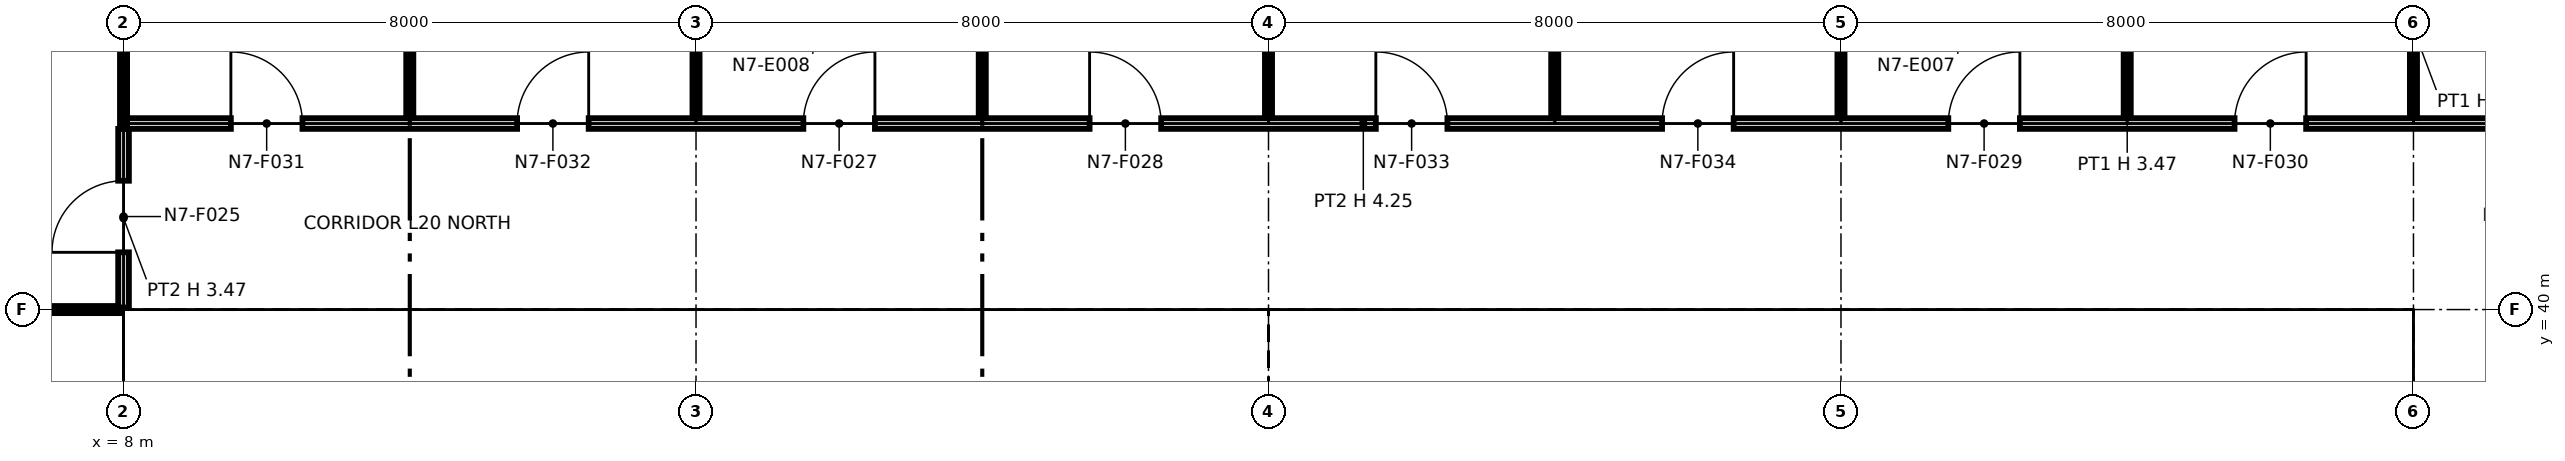
"""IFC4 building model, lengths in metres.
Left out: names, types, materials, properties, quantities, classifications, styles, units other than length and angle.
Written with IfcOpenShell. Run it as: python <this file> out.ifc"""

import sys

from ifc_helpers import new_model, si_unit, direction, frame, frame_2d, origin, origin_2d, place, context, subcontext, project, spatial, polyline, rectangle, i_section, outline, extrude, element, fill, save


model = new_model("IFC4")
c1 = context("Model", 3, precision=1e-05, world=origin(), true_north=direction((0.0, 1.0)))
c2 = subcontext(c1, "Body", "Model", "MODEL_VIEW")
j1 = project(units=[si_unit("LENGTHUNIT", "METRE"), si_unit("PLANEANGLEUNIT", "RADIAN")], contexts=[c1])
p1 = place(None, origin())
s1 = spatial("IfcSite", under=j1, at=p1, CompositionType="ELEMENT")
p2 = place(p1, origin())
s2 = spatial("IfcBuilding", under=s1, at=p2, CompositionType="ELEMENT")
p3 = place(p2, frame((0.0, 0.0, 105.2)))
s3 = spatial("IfcBuildingStorey", under=s2, at=p3, CompositionType="ELEMENT", Elevation=105.2)
for number, where, z_axis, x_axis in (
    (1, (8.0, 40.0, 0.0), (0.0, 0.0, 1.0), (1.0, 0.0, 0.0)),
    (2, (16.0, 40.0, 0.0), (0.0, 0.0, 1.0), (1.0, 0.0, 0.0)),
):
    element("IfcColumn", number, at=place(p3, frame(where, z_axis=z_axis, x_axis=x_axis)), inside=s3, PredefinedType="COLUMN", context=c2, shape_type="SweptSolid", body=[
        extrude(i_section(OverallWidth=0.373, OverallDepth=0.368, WebThickness=0.015, FlangeThickness=0.024, at=origin_2d()), origin(), (0.0, 0.0, 1.0), 4.25),
    ])
p4 = place(p3, frame((24.0, 40.0, 0.0), z_axis=(0.0, 0.0, 1.0), x_axis=(1.0, 0.0, 0.0)))
e3 = element("IfcColumn", 3, at=p4, inside=s3, PredefinedType="COLUMN", context=c2, shape_type="SweptSolid", body=[
    extrude(i_section(OverallWidth=0.394, OverallDepth=0.376, WebThickness=0.017, FlangeThickness=0.028, at=origin_2d()), origin(), (0.0, 0.0, 1.0), 4.25),
])
for number, where, z_axis, x_axis in (
    (4, (32.0, 40.0, 0.0), (0.0, 0.0, 1.0), (1.0, 0.0, 0.0)),
    (5, (40.0, 40.0, 0.0), (0.0, 0.0, 1.0), (1.0, 0.0, 0.0)),
):
    element("IfcColumn", number, at=place(p3, frame(where, z_axis=z_axis, x_axis=x_axis)), inside=s3, PredefinedType="COLUMN", context=c2, shape_type="SweptSolid", body=[
        extrude(i_section(OverallWidth=0.257, OverallDepth=0.363, WebThickness=0.013, FlangeThickness=0.022, at=origin_2d()), origin(), (0.0, 0.0, 1.0), 4.25),
    ])
p5 = place(p3, frame((8.75, 32.85, 0.0), z_axis=(0.0, 0.0, 1.0), x_axis=(0.0, 1.0, 0.0)))
e6 = element("IfcWall", 6, at=p5, inside=s3, PredefinedType="PARTITIONING", context=c2, shape_type="SweptSolid", body=[
    extrude(outline(polyline([(0.0, 0.0), (6.3, 0.0), (6.3, 4.25), (3.231, 4.25), (3.23, 3.789), (3.07, 3.789), (3.069, 4.25), (0.0, 4.25), (0.0, 0.0)])), frame((0.0, 0.1, 0.0), z_axis=(0.0, -1.0, 0.0), x_axis=(1.0, 0.0, 0.0)), (0.0, 0.0, 1.0), 0.2),
])
p6 = place(p3, frame((8.65, 39.25, 0.0), z_axis=(0.0, 0.0, 1.0), x_axis=(1.0, 0.0, 0.0)))
e7 = element("IfcWall", 7, at=p6, inside=s3, PredefinedType="PARTITIONING", context=c2, shape_type="SweptSolid", body=[
    extrude(outline(polyline([(0.0, 0.0), (14.7, 0.0), (14.7, 4.25), (7.469, 4.25), (7.469, 3.632), (7.231, 3.632), (7.23, 4.25), (0.0, 4.25), (0.0, 0.0)])), frame((0.0, 0.1, 0.0), z_axis=(0.0, -1.0, 0.0), x_axis=(1.0, 0.0, 0.0)), (0.0, 0.0, 1.0), 0.2),
])
for number, where, z_axis, x_axis in (
    (8, (11.875, 34.95, 0.0), (0.0, 0.0, 1.0), (0.0, 1.0, 0.0)),
    (9, (13.925, 34.95, 0.0), (0.0, 0.0, 1.0), (0.0, 1.0, 0.0)),
):
    element("IfcWall", number, at=place(p3, frame(where, z_axis=z_axis, x_axis=x_axis)), inside=s3, PredefinedType="PARTITIONING", context=c2, shape_type="SweptSolid", body=[
        extrude(outline(polyline([(0.0, 0.0), (4.2, 0.0), (4.2, 4.25), (1.132, 4.25), (1.131, 3.789), (0.969, 3.789), (0.969, 4.25), (0.0, 4.25), (0.0, 0.0)])), frame((0.0, 0.075, 0.0), z_axis=(0.0, -1.0, 0.0), x_axis=(1.0, 0.0, 0.0)), (0.0, 0.0, 1.0), 0.15),
    ])
p7 = place(p3, frame((16.0, 34.95, 0.0), z_axis=(0.0, 0.0, 1.0), x_axis=(0.0, 1.0, 0.0)))
e10 = element("IfcWall", 10, at=p7, inside=s3, PredefinedType="PARTITIONING", context=c2, shape_type="SweptSolid", body=[
    extrude(rectangle(XDim=4.2, YDim=0.6, at=frame_2d((2.1, 0.0))), origin(), (0.0, 0.0, 1.0), 3.632),
])
for number, where, z_axis, x_axis in (
    (11, (19.2, 32.85, 0.0), (0.0, 0.0, 1.0), (0.0, 1.0, 0.0)),
    (12, (23.25, 32.85, 0.0), (0.0, 0.0, 1.0), (0.0, 1.0, 0.0)),
):
    element("IfcWall", number, at=place(p3, frame(where, z_axis=z_axis, x_axis=x_axis)), inside=s3, PredefinedType="PARTITIONING", context=c2, shape_type="SweptSolid", body=[
        extrude(rectangle(XDim=6.3, YDim=0.2, at=frame_2d((3.15, 0.0))), origin(), (0.0, 0.0, 1.0), 4.25),
    ])
p8 = place(p3, frame((24.75, 32.85, 0.0), z_axis=(0.0, 0.0, 1.0), x_axis=(0.0, 1.0, 0.0)))
e13 = element("IfcWall", 13, at=p8, inside=s3, PredefinedType="PARTITIONING", context=c2, shape_type="SweptSolid", body=[
    extrude(outline(polyline([(0.0, 0.0), (6.3, 0.0), (6.3, 4.25), (3.231, 4.25), (3.23, 3.789), (3.07, 3.789), (3.069, 4.25), (0.0, 4.25), (0.0, 0.0)])), frame((0.0, 0.1, 0.0), z_axis=(0.0, -1.0, 0.0), x_axis=(1.0, 0.0, 0.0)), (0.0, 0.0, 1.0), 0.2),
])
p9 = place(p3, frame((24.65, 39.25, 0.0), z_axis=(0.0, 0.0, 1.0), x_axis=(1.0, 0.0, 0.0)))
e14 = element("IfcWall", 14, at=p9, inside=s3, PredefinedType="PARTITIONING", context=c2, shape_type="SweptSolid", body=[
    extrude(outline(polyline([(0.0, 0.0), (14.7, 0.0), (14.7, 4.25), (7.469, 4.25), (7.469, 3.632), (7.231, 3.632), (7.23, 4.25), (0.0, 4.25), (0.0, 0.0)])), frame((0.0, 0.1, 0.0), z_axis=(0.0, -1.0, 0.0), x_axis=(1.0, 0.0, 0.0)), (0.0, 0.0, 1.0), 0.2),
])
for number, where, z_axis, x_axis in (
    (15, (27.2, 36.6, 0.0), (0.0, 0.0, 1.0), (0.0, 1.0, 0.0)),
    (16, (29.5, 36.6, 0.0), (0.0, 0.0, 1.0), (0.0, 1.0, 0.0)),
):
    element("IfcWall", number, at=place(p3, frame(where, z_axis=z_axis, x_axis=x_axis)), inside=s3, PredefinedType="PARTITIONING", context=c2, shape_type="SweptSolid", body=[
        extrude(rectangle(XDim=2.55, YDim=0.2, at=frame_2d((1.275, 0.0))), origin(), (0.0, 0.0, 1.0), 4.25),
    ])
p10 = place(p3, frame((32.0, 36.6, 0.0), z_axis=(0.0, 0.0, 1.0), x_axis=(0.0, 1.0, 0.0)))
e17 = element("IfcWall", 17, at=p10, inside=s3, PredefinedType="PARTITIONING", context=c2, shape_type="SweptSolid", body=[
    extrude(rectangle(XDim=2.55, YDim=0.6, at=frame_2d((1.275, 0.0))), origin(), (0.0, 0.0, 1.0), 3.632),
])
for number, where, z_axis, x_axis in (
    (18, (35.6, 32.85, 0.0), (0.0, 0.0, 1.0), (0.0, 1.0, 0.0)),
    (19, (39.25, 32.85, 0.0), (0.0, 0.0, 1.0), (0.0, 1.0, 0.0)),
):
    element("IfcWall", number, at=place(p3, frame(where, z_axis=z_axis, x_axis=x_axis)), inside=s3, PredefinedType="PARTITIONING", context=c2, shape_type="SweptSolid", body=[
        extrude(rectangle(XDim=6.3, YDim=0.2, at=frame_2d((3.15, 0.0))), origin(), (0.0, 0.0, 1.0), 4.25),
    ])
p11 = place(p3, frame((2.83, 40.0, 0.0), z_axis=(0.0, 0.0, 1.0), x_axis=(1.0, 0.0, 0.0)))
e20 = element("IfcWall", 20, at=p11, inside=s3, PredefinedType="PARTITIONING", context=c2, shape_type="SweptSolid", body=[
    extrude(rectangle(XDim=5.14, YDim=0.1, at=frame_2d((2.57, 0.0))), origin(), (0.0, 0.0, 1.0), 3.47),
])
p12 = place(p3, frame((8.0, 40.03, 0.0), z_axis=(0.0, 0.0, 1.0), x_axis=(0.0, 1.0, 0.0)))
e21 = element("IfcWall", 21, at=p12, inside=s3, PredefinedType="PARTITIONING", context=c2, shape_type="SweptSolid", body=[
    extrude(rectangle(XDim=2.495, YDim=0.15, at=frame_2d((1.248, 0.0))), origin(), (0.0, 0.0, 1.0), 3.47),
])
p13 = place(p12, frame((0.77, 0.0, 0.0)))
e22 = element("IfcOpeningElement", 22, at=p13, cuts=e21, PredefinedType="OPENING", context=c2, shape_type="SweptSolid", body=[
    extrude(rectangle(XDim=1.0, YDim=2.1, at=frame_2d((0.5, 1.05))), frame((0.0, 0.085, 0.0), z_axis=(0.0, -1.0, 0.0), x_axis=(1.0, 0.0, 0.0)), (0.0, 0.0, 1.0), 0.17),
])
p14 = place(p3, frame((8.05, 42.6, 0.0), z_axis=(0.0, 0.0, 1.0), x_axis=(1.0, 0.0, 0.0)))
e23 = element("IfcWall", 23, at=p14, inside=s3, PredefinedType="PARTITIONING", context=c2, shape_type="SweptSolid", body=[
    extrude(rectangle(XDim=34.55, YDim=0.15, at=frame_2d((17.275, 0.0))), origin(), (0.0, 0.0, 1.0), 4.25),
])
p15 = place(p14, frame((9.45, 0.0, 0.0)))
e24 = element("IfcOpeningElement", 24, at=p15, cuts=e23, PredefinedType="OPENING", context=c2, shape_type="SweptSolid", body=[
    extrude(rectangle(XDim=1.0, YDim=2.1, at=frame_2d((0.5, 1.05))), frame((0.0, 0.085, 0.0), z_axis=(0.0, -1.0, 0.0), x_axis=(1.0, 0.0, 0.0)), (0.0, 0.0, 1.0), 0.17),
])
p16 = place(p14, frame((13.45, 0.0, 0.0)))
e25 = element("IfcOpeningElement", 25, at=p16, cuts=e23, PredefinedType="OPENING", context=c2, shape_type="SweptSolid", body=[
    extrude(rectangle(XDim=1.0, YDim=2.1, at=frame_2d((0.5, 1.05))), frame((0.0, 0.085, 0.0), z_axis=(0.0, -1.0, 0.0), x_axis=(1.0, 0.0, 0.0)), (0.0, 0.0, 1.0), 0.17),
])
p17 = place(p14, frame((25.45, 0.0, 0.0)))
e26 = element("IfcOpeningElement", 26, at=p17, cuts=e23, PredefinedType="OPENING", context=c2, shape_type="SweptSolid", body=[
    extrude(rectangle(XDim=1.0, YDim=2.1, at=frame_2d((0.5, 1.05))), frame((0.0, 0.085, 0.0), z_axis=(0.0, -1.0, 0.0), x_axis=(1.0, 0.0, 0.0)), (0.0, 0.0, 1.0), 0.17),
])
p18 = place(p14, frame((29.45, 0.0, 0.0)))
e27 = element("IfcOpeningElement", 27, at=p18, cuts=e23, PredefinedType="OPENING", context=c2, shape_type="SweptSolid", body=[
    extrude(rectangle(XDim=1.0, YDim=2.1, at=frame_2d((0.5, 1.05))), frame((0.0, 0.085, 0.0), z_axis=(0.0, -1.0, 0.0), x_axis=(1.0, 0.0, 0.0)), (0.0, 0.0, 1.0), 0.17),
])
p19 = place(p14, frame((1.45, 0.0, 0.0)))
e28 = element("IfcOpeningElement", 28, at=p19, cuts=e23, PredefinedType="OPENING", context=c2, shape_type="SweptSolid", body=[
    extrude(rectangle(XDim=1.0, YDim=2.1, at=frame_2d((0.5, 1.05))), frame((0.0, 0.085, 0.0), z_axis=(0.0, -1.0, 0.0), x_axis=(1.0, 0.0, 0.0)), (0.0, 0.0, 1.0), 0.17),
])
p20 = place(p14, frame((5.45, 0.0, 0.0)))
e29 = element("IfcOpeningElement", 29, at=p20, cuts=e23, PredefinedType="OPENING", context=c2, shape_type="SweptSolid", body=[
    extrude(rectangle(XDim=1.0, YDim=2.1, at=frame_2d((0.5, 1.05))), frame((0.0, 0.085, 0.0), z_axis=(0.0, -1.0, 0.0), x_axis=(1.0, 0.0, 0.0)), (0.0, 0.0, 1.0), 0.17),
])
p21 = place(p14, frame((17.45, 0.0, 0.0)))
e30 = element("IfcOpeningElement", 30, at=p21, cuts=e23, PredefinedType="OPENING", context=c2, shape_type="SweptSolid", body=[
    extrude(rectangle(XDim=1.0, YDim=2.1, at=frame_2d((0.5, 1.05))), frame((0.0, 0.085, 0.0), z_axis=(0.0, -1.0, 0.0), x_axis=(1.0, 0.0, 0.0)), (0.0, 0.0, 1.0), 0.17),
])
p22 = place(p14, frame((21.45, 0.0, 0.0)))
e31 = element("IfcOpeningElement", 31, at=p22, cuts=e23, PredefinedType="OPENING", context=c2, shape_type="SweptSolid", body=[
    extrude(rectangle(XDim=1.0, YDim=2.1, at=frame_2d((0.5, 1.05))), frame((0.0, 0.085, 0.0), z_axis=(0.0, -1.0, 0.0), x_axis=(1.0, 0.0, 0.0)), (0.0, 0.0, 1.0), 0.17),
])
p23 = place(p3, frame((8.0, 42.6, 0.0), z_axis=(0.0, 0.0, 1.0), x_axis=(0.0, 1.0, 0.0)))
e32 = element("IfcWall", 32, at=p23, inside=s3, PredefinedType="PARTITIONING", context=c2, shape_type="SweptSolid", body=[
    extrude(rectangle(XDim=5.27, YDim=0.1, at=frame_2d((2.635, 0.0))), origin(), (0.0, 0.0, 1.0), 3.47),
])
p24 = place(p3, frame((12.0, 42.675, 0.0), z_axis=(0.0, 0.0, 1.0), x_axis=(0.0, 1.0, 0.0)))
e33 = element("IfcWall", 33, at=p24, inside=s3, PredefinedType="PARTITIONING", context=c2, shape_type="SweptSolid", body=[
    extrude(outline(polyline([(0.0, 0.0), (5.195, 0.0), (5.195, 4.25), (1.625, 4.25), (1.623, 3.47), (1.027, 3.47), (1.025, 4.25), (0.0, 4.25), (0.0, 0.0)])), frame((0.0, 0.05, 0.0), z_axis=(0.0, -1.0, 0.0), x_axis=(1.0, 0.0, 0.0)), (0.0, 0.0, 1.0), 0.1),
])
for number, where, z_axis, x_axis in (
    (34, (16.0, 42.675, 0.0), (0.0, 0.0, 1.0), (0.0, 1.0, 0.0)),
    (35, (20.0, 42.675, 0.0), (0.0, 0.0, 1.0), (0.0, 1.0, 0.0)),
    (36, (24.0, 42.675, 0.0), (0.0, 0.0, 1.0), (0.0, 1.0, 0.0)),
):
    element("IfcWall", number, at=place(p3, frame(where, z_axis=z_axis, x_axis=x_axis)), inside=s3, PredefinedType="PARTITIONING", context=c2, shape_type="SweptSolid", body=[
        extrude(rectangle(XDim=2.495, YDim=0.1, at=frame_2d((1.248, 0.0))), origin(), (0.0, 0.0, 1.0), 3.47),
    ])
p25 = place(p3, frame((28.0, 42.675, 0.0), z_axis=(0.0, 0.0, 1.0), x_axis=(0.0, 1.0, 0.0)))
e37 = element("IfcWall", 37, at=p25, inside=s3, PredefinedType="PARTITIONING", context=c2, shape_type="SweptSolid", body=[
    extrude(outline(polyline([(0.0, 0.0), (5.195, 0.0), (5.195, 4.25), (1.625, 4.25), (1.623, 3.47), (1.027, 3.47), (1.025, 4.25), (0.0, 4.25), (0.0, 0.0)])), frame((0.0, 0.05, 0.0), z_axis=(0.0, -1.0, 0.0), x_axis=(1.0, 0.0, 0.0)), (0.0, 0.0, 1.0), 0.1),
])
for number, where, z_axis, x_axis in (
    (38, (32.0, 42.675, 0.0), (0.0, 0.0, 1.0), (0.0, 1.0, 0.0)),
    (39, (36.0, 42.675, 0.0), (0.0, 0.0, 1.0), (0.0, 1.0, 0.0)),
    (40, (40.0, 42.675, 0.0), (0.0, 0.0, 1.0), (0.0, 1.0, 0.0)),
):
    element("IfcWall", number, at=place(p3, frame(where, z_axis=z_axis, x_axis=x_axis)), inside=s3, PredefinedType="PARTITIONING", context=c2, shape_type="SweptSolid", body=[
        extrude(rectangle(XDim=2.495, YDim=0.1, at=frame_2d((1.248, 0.0))), origin(), (0.0, 0.0, 1.0), 3.47),
    ])
p26 = place(p13, origin())
e41 = element("IfcDoor", 41, at=p26, inside=s3, OperationType="SINGLE_SWING_LEFT", PredefinedType="DOOR", context=c2, shape_type="SweptSolid", body=[
    extrude(rectangle(XDim=1.0, YDim=2.1, at=frame_2d((0.5, 1.05))), frame((0.0, 0.025, 0.0), z_axis=(0.0, -1.0, 0.0), x_axis=(1.0, 0.0, 0.0)), (0.0, 0.0, 1.0), 0.05),
])
fill(e22, e41)
p27 = place(p15, origin())
e42 = element("IfcDoor", 42, at=p27, inside=s3, OperationType="SINGLE_SWING_RIGHT", PredefinedType="DOOR", context=c2, shape_type="SweptSolid", body=[
    extrude(rectangle(XDim=1.0, YDim=2.1, at=frame_2d((0.5, 1.05))), frame((0.0, 0.025, 0.0), z_axis=(0.0, -1.0, 0.0), x_axis=(1.0, 0.0, 0.0)), (0.0, 0.0, 1.0), 0.05),
])
fill(e24, e42)
p28 = place(p16, origin())
e43 = element("IfcDoor", 43, at=p28, inside=s3, OperationType="SINGLE_SWING_LEFT", PredefinedType="DOOR", context=c2, shape_type="SweptSolid", body=[
    extrude(rectangle(XDim=1.0, YDim=2.1, at=frame_2d((0.5, 1.05))), frame((0.0, 0.025, 0.0), z_axis=(0.0, -1.0, 0.0), x_axis=(1.0, 0.0, 0.0)), (0.0, 0.0, 1.0), 0.05),
])
fill(e25, e43)
p29 = place(p17, origin())
e44 = element("IfcDoor", 44, at=p29, inside=s3, OperationType="SINGLE_SWING_RIGHT", PredefinedType="DOOR", context=c2, shape_type="SweptSolid", body=[
    extrude(rectangle(XDim=1.0, YDim=2.1, at=frame_2d((0.5, 1.05))), frame((0.0, 0.025, 0.0), z_axis=(0.0, -1.0, 0.0), x_axis=(1.0, 0.0, 0.0)), (0.0, 0.0, 1.0), 0.05),
])
fill(e26, e44)
p30 = place(p18, origin())
e45 = element("IfcDoor", 45, at=p30, inside=s3, OperationType="SINGLE_SWING_RIGHT", PredefinedType="DOOR", context=c2, shape_type="SweptSolid", body=[
    extrude(rectangle(XDim=1.0, YDim=2.1, at=frame_2d((0.5, 1.05))), frame((0.0, 0.025, 0.0), z_axis=(0.0, -1.0, 0.0), x_axis=(1.0, 0.0, 0.0)), (0.0, 0.0, 1.0), 0.05),
])
fill(e27, e45)
p31 = place(p19, origin())
e46 = element("IfcDoor", 46, at=p31, inside=s3, OperationType="SINGLE_SWING_LEFT", PredefinedType="DOOR", context=c2, shape_type="SweptSolid", body=[
    extrude(rectangle(XDim=1.0, YDim=2.1, at=frame_2d((0.5, 1.05))), frame((0.0, 0.025, 0.0), z_axis=(0.0, -1.0, 0.0), x_axis=(1.0, 0.0, 0.0)), (0.0, 0.0, 1.0), 0.05),
])
fill(e28, e46)
p32 = place(p20, origin())
e47 = element("IfcDoor", 47, at=p32, inside=s3, OperationType="SINGLE_SWING_RIGHT", PredefinedType="DOOR", context=c2, shape_type="SweptSolid", body=[
    extrude(rectangle(XDim=1.0, YDim=2.1, at=frame_2d((0.5, 1.05))), frame((0.0, 0.025, 0.0), z_axis=(0.0, -1.0, 0.0), x_axis=(1.0, 0.0, 0.0)), (0.0, 0.0, 1.0), 0.05),
])
fill(e29, e47)
p33 = place(p21, origin())
e48 = element("IfcDoor", 48, at=p33, inside=s3, OperationType="SINGLE_SWING_LEFT", PredefinedType="DOOR", context=c2, shape_type="SweptSolid", body=[
    extrude(rectangle(XDim=1.0, YDim=2.1, at=frame_2d((0.5, 1.05))), frame((0.0, 0.025, 0.0), z_axis=(0.0, -1.0, 0.0), x_axis=(1.0, 0.0, 0.0)), (0.0, 0.0, 1.0), 0.05),
])
fill(e30, e48)
p34 = place(p22, origin())
e49 = element("IfcDoor", 49, at=p34, inside=s3, OperationType="SINGLE_SWING_RIGHT", PredefinedType="DOOR", context=c2, shape_type="SweptSolid", body=[
    extrude(rectangle(XDim=1.0, YDim=2.1, at=frame_2d((0.5, 1.05))), frame((0.0, 0.025, 0.0), z_axis=(0.0, -1.0, 0.0), x_axis=(1.0, 0.0, 0.0)), (0.0, 0.0, 1.0), 0.05),
])
fill(e31, e49)
save(model, sys.argv[1])
